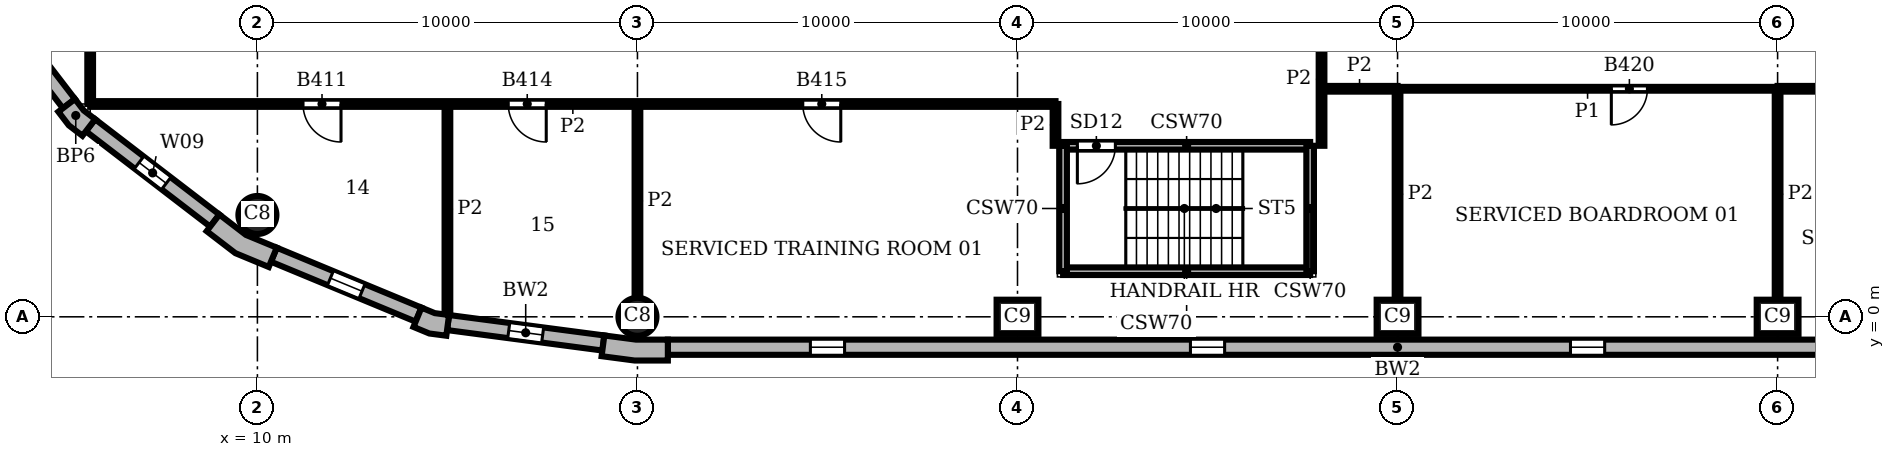
"""IFC4 building model, lengths in metres.
Left out: names, types, materials, properties, quantities, classifications, styles, units other than length and angle.
Written with IfcOpenShell. Run it as: python <this file> out.ifc"""

import sys

from ifc_helpers import new_model, si_unit, direction, frame, frame_2d, origin, origin_2d, place, context, subcontext, project, spatial, polyline, rectangle, circle, outline, extrude, element, fill, save


model = new_model("IFC4")
c1 = context("Model", 3, precision=1e-05, world=origin(), true_north=direction((0.0, 1.0)))
c2 = subcontext(c1, "Body", "Model", "MODEL_VIEW")
j1 = project(units=[si_unit("LENGTHUNIT", "METRE"), si_unit("PLANEANGLEUNIT", "RADIAN")], contexts=[c1])
p1 = place(None, origin())
s1 = spatial("IfcSite", under=j1, at=p1, CompositionType="ELEMENT")
p2 = place(p1, origin())
s2 = spatial("IfcBuilding", under=s1, at=p2, CompositionType="ELEMENT")
p3 = place(p2, frame((0.0, 0.0, 166.8)))
s3 = spatial("IfcBuildingStorey", under=s2, at=p3, CompositionType="ELEMENT", Elevation=166.8)
p4 = place(p3, frame((20.0, 0.0, 0.0), z_axis=(0.0, 0.0, 1.0), x_axis=(1.0, 0.0, 0.0)))
e1 = element("IfcColumn", 1, at=p4, inside=s3, PredefinedType="COLUMN", context=c2, shape_type="SweptSolid", body=[
    extrude(circle(Radius=0.5, at=origin_2d()), origin(), (0.0, 0.0, 1.0), 3.9),
])
for number, where, z_axis, x_axis in (
    (2, (30.0, 0.0, 0.0), (0.0, 0.0, 1.0), (1.0, 0.0, 0.0)),
    (3, (40.0, 0.0, 0.0), (0.0, 0.0, 1.0), (1.0, 0.0, 0.0)),
    (4, (50.0, 0.0, 0.0), (0.0, 0.0, 1.0), (1.0, 0.0, 0.0)),
):
    element("IfcColumn", number, at=place(p3, frame(where, z_axis=z_axis, x_axis=x_axis)), inside=s3, PredefinedType="COLUMN", context=c2, shape_type="SweptSolid", body=[
        extrude(rectangle(XDim=1.1, YDim=0.9, at=origin_2d()), origin(), (0.0, 0.0, 1.0), 3.9),
    ])
p5 = place(p3, frame((10.0, 2.679, 0.0), z_axis=(0.0, 0.0, 1.0), x_axis=(1.0, 0.0, 0.0)))
e5 = element("IfcColumn", 5, at=p5, inside=s3, PredefinedType="COLUMN", context=c2, shape_type="SweptSolid", body=[
    extrude(circle(Radius=0.5, at=origin_2d()), origin(), (0.0, 0.0, 1.0), 3.9),
])
p6 = place(p3, origin())
e6 = element("IfcWall", 6, at=p6, inside=s3, PredefinedType="SOLIDWALL", context=c2, shape_type="SweptSolid", body=[
    extrude(outline(polyline([(19.076, -0.887), (19.057, -1.036), (19.925, -1.15), (20.8, -1.15), (20.8, -1.0), (20.8, -0.6), (19.961, -0.6), (19.128, -0.49), (19.076, -0.887)])), origin(), (0.0, 0.0, 1.0), 3.9),
])
e7 = element("IfcWall", 7, at=p6, inside=s3, PredefinedType="SOLIDWALL", context=c2, shape_type="SweptSolid", body=[
    extrude(outline(polyline([(4.882, 5.487), (4.763, 5.396), (5.038, 5.038), (5.396, 4.763), (5.487, 4.882), (5.731, 5.199), (5.43, 5.43), (5.199, 5.731), (4.882, 5.487)])), origin(), (0.0, 0.0, 1.0), 3.9),
])
e8 = element("IfcWall", 8, at=p6, inside=s3, PredefinedType="SOLIDWALL", context=c2, shape_type="SweptSolid", body=[
    extrude(outline(polyline([(8.757, 2.373), (8.665, 2.254), (9.42, 1.675), (10.299, 1.311), (10.356, 1.449), (10.51, 1.819), (9.698, 2.155), (9.0, 2.69), (8.757, 2.373)])), origin(), (0.0, 0.0, 1.0), 3.9),
])
e9 = element("IfcWall", 9, at=p6, inside=s3, PredefinedType="SOLIDWALL", context=c2, shape_type="SweptSolid", body=[
    extrude(outline(polyline([(14.164, -0.128), (14.106, -0.266), (14.523, -0.439), (14.971, -0.498), (14.99, -0.349), (15.043, 0.047), (14.667, 0.097), (14.317, 0.242), (14.164, -0.128)])), origin(), (0.0, 0.0, 1.0), 3.9),
])
p7 = place(p3, frame((20.8, -0.8, 0.0), z_axis=(0.0, 0.0, 1.0), x_axis=(1.0, 0.0, 0.0)))
e10 = element("IfcWall", 10, at=p7, inside=s3, PredefinedType="SOLIDWALL", context=c2, shape_type="SweptSolid", body=[
    extrude(rectangle(XDim=38.4, YDim=0.4, at=frame_2d((19.2, 0.0))), origin(), (0.0, 0.0, 1.0), 3.9),
])
p8 = place(p7, frame((3.75, 0.0, 0.9)))
e11 = element("IfcOpeningElement", 11, at=p8, cuts=e10, PredefinedType="OPENING", context=c2, shape_type="SweptSolid", body=[
    extrude(rectangle(XDim=0.9, YDim=2.35, at=frame_2d((0.45, 1.175))), frame((0.0, 0.21, 0.0), z_axis=(0.0, -1.0, 0.0), x_axis=(1.0, 0.0, 0.0)), (0.0, 0.0, 1.0), 0.42),
])
p9 = place(p7, frame((13.75, 0.0, 0.9)))
e12 = element("IfcOpeningElement", 12, at=p9, cuts=e10, PredefinedType="OPENING", context=c2, shape_type="SweptSolid", body=[
    extrude(rectangle(XDim=0.9, YDim=2.35, at=frame_2d((0.45, 1.175))), frame((0.0, 0.21, 0.0), z_axis=(0.0, -1.0, 0.0), x_axis=(1.0, 0.0, 0.0)), (0.0, 0.0, 1.0), 0.42),
])
p10 = place(p7, frame((23.75, 0.0, 0.9)))
e13 = element("IfcOpeningElement", 13, at=p10, cuts=e10, PredefinedType="OPENING", context=c2, shape_type="SweptSolid", body=[
    extrude(rectangle(XDim=0.9, YDim=2.35, at=frame_2d((0.45, 1.175))), frame((0.0, 0.21, 0.0), z_axis=(0.0, -1.0, 0.0), x_axis=(1.0, 0.0, 0.0)), (0.0, 0.0, 1.0), 0.42),
])
p11 = place(p7, frame((33.75, 0.0, 0.9)))
e14 = element("IfcOpeningElement", 14, at=p11, cuts=e10, PredefinedType="OPENING", context=c2, shape_type="SweptSolid", body=[
    extrude(rectangle(XDim=0.9, YDim=2.35, at=frame_2d((0.45, 1.175))), frame((0.0, 0.21, 0.0), z_axis=(0.0, -1.0, 0.0), x_axis=(1.0, 0.0, 0.0)), (0.0, 0.0, 1.0), 0.42),
])
p12 = place(p3, frame((2.532, 8.878, 0.0), z_axis=(0.0, 0.0, 1.0), x_axis=(0.608759824817, -0.793354571229, 0.0)))
e15 = element("IfcWall", 15, at=p12, inside=s3, PredefinedType="SOLIDWALL", context=c2, shape_type="SweptSolid", body=[
    extrude(rectangle(XDim=4.121, YDim=0.4, at=frame_2d((2.061, 0.0))), origin(), (0.0, 0.0, 1.0), 3.9),
])
p13 = place(p12, frame((1.611, 0.0, 0.9)))
e16 = element("IfcOpeningElement", 16, at=p13, cuts=e15, PredefinedType="OPENING", context=c2, shape_type="SweptSolid", body=[
    extrude(rectangle(XDim=0.9, YDim=2.35, at=frame_2d((0.45, 1.175))), frame((0.0, 0.21, 0.0), z_axis=(0.0, -1.0, 0.0), x_axis=(1.0, 0.0, 0.0)), (0.0, 0.0, 1.0), 0.42),
])
p14 = place(p3, frame((5.609, 5.041, 0.0), z_axis=(0.0, 0.0, 1.0), x_axis=(0.793354571229, -0.608759824817, 0.0)))
e17 = element("IfcWall", 17, at=p14, inside=s3, PredefinedType="SOLIDWALL", context=c2, shape_type="SweptSolid", body=[
    extrude(rectangle(XDim=4.121, YDim=0.4, at=frame_2d((2.061, 0.0))), origin(), (0.0, 0.0, 1.0), 3.9),
])
p15 = place(p14, frame((1.611, 0.0, 0.9)))
e18 = element("IfcOpeningElement", 18, at=p15, cuts=e17, PredefinedType="OPENING", context=c2, shape_type="SweptSolid", body=[
    extrude(rectangle(XDim=0.9, YDim=2.35, at=frame_2d((0.45, 1.175))), frame((0.0, 0.21, 0.0), z_axis=(0.0, -1.0, 0.0), x_axis=(1.0, 0.0, 0.0)), (0.0, 0.0, 1.0), 0.42),
])
p16 = place(p3, frame((10.433, 1.634, 0.0), z_axis=(0.0, 0.0, 1.0), x_axis=(0.923863744394, -0.382721546029, 0.0)))
e19 = element("IfcWall", 19, at=p16, inside=s3, PredefinedType="SOLIDWALL", context=c2, shape_type="SweptSolid", body=[
    extrude(rectangle(XDim=4.121, YDim=0.4, at=frame_2d((2.061, 0.0))), origin(), (0.0, 0.0, 1.0), 3.9),
])
p17 = place(p16, frame((1.611, 0.0, 0.9)))
e20 = element("IfcOpeningElement", 20, at=p17, cuts=e19, PredefinedType="OPENING", context=c2, shape_type="SweptSolid", body=[
    extrude(rectangle(XDim=0.9, YDim=2.35, at=frame_2d((0.45, 1.175))), frame((0.0, 0.21, 0.0), z_axis=(0.0, -1.0, 0.0), x_axis=(1.0, 0.0, 0.0)), (0.0, 0.0, 1.0), 0.42),
])
p18 = place(p3, frame((15.017, -0.151, 0.0), z_axis=(0.0, 0.0, 1.0), x_axis=(0.991446429508, -0.130514280502, 0.0)))
e21 = element("IfcWall", 21, at=p18, inside=s3, PredefinedType="SOLIDWALL", context=c2, shape_type="SweptSolid", body=[
    extrude(rectangle(XDim=4.121, YDim=0.4, at=frame_2d((2.061, 0.0))), origin(), (0.0, 0.0, 1.0), 3.9),
])
p19 = place(p18, frame((1.611, 0.0, 0.9)))
e22 = element("IfcOpeningElement", 22, at=p19, cuts=e21, PredefinedType="OPENING", context=c2, shape_type="SweptSolid", body=[
    extrude(rectangle(XDim=0.9, YDim=2.35, at=frame_2d((0.45, 1.175))), frame((0.0, 0.21, 0.0), z_axis=(0.0, -1.0, 0.0), x_axis=(1.0, 0.0, 0.0)), (0.0, 0.0, 1.0), 0.42),
])
p20 = place(p3, frame((31.2, 1.2, 0.0), z_axis=(0.0, 0.0, 1.0), x_axis=(1.0, 0.0, 0.0)))
e23 = element("IfcWall", 23, at=p20, inside=s3, PredefinedType="SHEAR", context=c2, shape_type="SweptSolid", body=[
    extrude(rectangle(XDim=6.5, YDim=0.2, at=frame_2d((3.25, 0.0))), origin(), (0.0, 0.0, 1.0), 3.58),
])
p21 = place(p3, frame((31.2, 4.5, 0.0), z_axis=(0.0, 0.0, 1.0), x_axis=(1.0, 0.0, 0.0)))
e24 = element("IfcWall", 24, at=p21, inside=s3, PredefinedType="SHEAR", context=c2, shape_type="SweptSolid", body=[
    extrude(rectangle(XDim=6.5, YDim=0.2, at=frame_2d((3.25, 0.0))), origin(), (0.0, 0.0, 1.0), 3.58),
])
p22 = place(p21, frame((0.375, 0.0, 0.0)))
e25 = element("IfcOpeningElement", 25, at=p22, cuts=e24, PredefinedType="OPENING", context=c2, shape_type="SweptSolid", body=[
    extrude(rectangle(XDim=1.0, YDim=2.1, at=frame_2d((0.5, 1.05))), frame((0.0, 0.11, 0.0), z_axis=(0.0, -1.0, 0.0), x_axis=(1.0, 0.0, 0.0)), (0.0, 0.0, 1.0), 0.22),
])
for number, where, z_axis, x_axis in (
    (26, (31.2, 1.2, 0.0), (0.0, 0.0, 1.0), (0.0, 1.0, 0.0)),
    (27, (37.7, 1.2, 0.0), (0.0, 0.0, 1.0), (0.0, 1.0, 0.0)),
):
    element("IfcWall", number, at=place(p3, frame(where, z_axis=z_axis, x_axis=x_axis)), inside=s3, PredefinedType="SHEAR", context=c2, shape_type="SweptSolid", body=[
        extrude(rectangle(XDim=3.3, YDim=0.2, at=frame_2d((1.65, 0.0))), origin(), (0.0, 0.0, 1.0), 3.58),
    ])
p23 = place(p3, frame((40.0, 6.0, 0.0), z_axis=(0.0, 0.0, 1.0), x_axis=(1.0, 0.0, 0.0)))
e28 = element("IfcWall", 28, at=p23, inside=s3, PredefinedType="PARTITIONING", context=c2, shape_type="SweptSolid", body=[
    extrude(rectangle(XDim=10.0, YDim=0.1, at=frame_2d((5.0, 0.0))), origin(), (0.0, 0.0, 1.0), 3.58),
])
p24 = place(p23, frame((5.625, 0.0, 0.0)))
e29 = element("IfcOpeningElement", 29, at=p24, cuts=e28, PredefinedType="OPENING", context=c2, shape_type="SweptSolid", body=[
    extrude(rectangle(XDim=0.95, YDim=2.1, at=frame_2d((0.475, 1.05))), frame((0.0, 0.06, 0.0), z_axis=(0.0, -1.0, 0.0), x_axis=(1.0, 0.0, 0.0)), (0.0, 0.0, 1.0), 0.12),
])
p25 = place(p3, frame((5.6, 5.6, 0.0), z_axis=(0.0, 0.0, 1.0), x_axis=(0.0, 1.0, 0.0)))
e30 = element("IfcWall", 30, at=p25, inside=s3, PredefinedType="PARTITIONING", context=c2, shape_type="SweptSolid", body=[
    extrude(rectangle(XDim=22.4, YDim=0.15, at=frame_2d((11.2, 0.0))), origin(), (0.0, 0.0, 1.0), 3.58),
])
p26 = place(p25, frame((5.35, 0.0, 0.0)))
e31 = element("IfcOpeningElement", 31, at=p26, cuts=e30, PredefinedType="OPENING", context=c2, shape_type="SweptSolid", body=[
    extrude(rectangle(XDim=1.0, YDim=2.1, at=frame_2d((0.5, 1.05))), frame((0.0, 0.085, 0.0), z_axis=(0.0, -1.0, 0.0), x_axis=(1.0, 0.0, 0.0)), (0.0, 0.0, 1.0), 0.17),
])
p27 = place(p25, frame((11.25, 0.0, 0.0)))
e32 = element("IfcOpeningElement", 32, at=p27, cuts=e30, PredefinedType="OPENING", context=c2, shape_type="SweptSolid", body=[
    extrude(rectangle(XDim=1.0, YDim=2.1, at=frame_2d((0.5, 1.05))), frame((0.0, 0.085, 0.0), z_axis=(0.0, -1.0, 0.0), x_axis=(1.0, 0.0, 0.0)), (0.0, 0.0, 1.0), 0.17),
])
p28 = place(p25, frame((18.25, 0.0, 0.0)))
e33 = element("IfcOpeningElement", 33, at=p28, cuts=e30, PredefinedType="OPENING", context=c2, shape_type="SweptSolid", body=[
    extrude(rectangle(XDim=1.8, YDim=2.1, at=frame_2d((0.9, 1.05))), frame((0.0, 0.085, 0.0), z_axis=(0.0, -1.0, 0.0), x_axis=(1.0, 0.0, 0.0)), (0.0, 0.0, 1.0), 0.17),
])
p29 = place(p3, frame((15.0, 0.063, 0.0), z_axis=(0.0, 0.0, 1.0), x_axis=(0.0, 1.0, 0.0)))
e34 = element("IfcWall", 34, at=p29, inside=s3, PredefinedType="PARTITIONING", context=c2, shape_type="SweptSolid", body=[
    extrude(rectangle(XDim=5.537, YDim=0.15, at=frame_2d((2.769, 0.0))), origin(), (0.0, 0.0, 1.0), 3.58),
])
p30 = place(p3, frame((20.0, 0.5, 0.0), z_axis=(0.0, 0.0, 1.0), x_axis=(0.0, 1.0, 0.0)))
e35 = element("IfcWall", 35, at=p30, inside=s3, PredefinedType="PARTITIONING", context=c2, shape_type="SweptSolid", body=[
    extrude(rectangle(XDim=5.1, YDim=0.15, at=frame_2d((2.55, 0.0))), origin(), (0.0, 0.0, 1.0), 3.58),
])
p31 = place(p3, frame((31.0, 4.5, 0.0), z_axis=(0.0, 0.0, 1.0), x_axis=(0.0, 1.0, 0.0)))
e36 = element("IfcWall", 36, at=p31, inside=s3, PredefinedType="PARTITIONING", context=c2, shape_type="SweptSolid", body=[
    extrude(rectangle(XDim=1.1, YDim=0.15, at=frame_2d((0.55, 0.0))), origin(), (0.0, 0.0, 1.0), 3.58),
])
p32 = place(p3, frame((38.0, 4.5, 0.0), z_axis=(0.0, 0.0, 1.0), x_axis=(0.0, 1.0, 0.0)))
e37 = element("IfcWall", 37, at=p32, inside=s3, PredefinedType="PARTITIONING", context=c2, shape_type="SweptSolid", body=[
    extrude(rectangle(XDim=3.5, YDim=0.15, at=frame_2d((1.75, 0.0))), origin(), (0.0, 0.0, 1.0), 3.58),
])
for number, where, z_axis, x_axis in (
    (38, (40.0, 0.45, 0.0), (0.0, 0.0, 1.0), (0.0, 1.0, 0.0)),
    (39, (50.0, 0.45, 0.0), (0.0, 0.0, 1.0), (0.0, 1.0, 0.0)),
):
    element("IfcWall", number, at=place(p3, frame(where, z_axis=z_axis, x_axis=x_axis)), inside=s3, PredefinedType="PARTITIONING", context=c2, shape_type="SweptSolid", body=[
        extrude(rectangle(XDim=5.55, YDim=0.15, at=frame_2d((2.775, 0.0))), origin(), (0.0, 0.0, 1.0), 3.58),
    ])
p33 = place(p3, frame((5.6, 5.6, 0.0), z_axis=(0.0, 0.0, 1.0), x_axis=(1.0, 0.0, 0.0)))
e40 = element("IfcWall", 40, at=p33, inside=s3, PredefinedType="PARTITIONING", context=c2, shape_type="SweptSolid", body=[
    extrude(rectangle(XDim=25.4, YDim=0.15, at=frame_2d((12.7, 0.0))), origin(), (0.0, 0.0, 1.0), 3.58),
])
p34 = place(p33, frame((5.6, 0.0, 0.0)))
e41 = element("IfcOpeningElement", 41, at=p34, cuts=e40, PredefinedType="OPENING", context=c2, shape_type="SweptSolid", body=[
    extrude(rectangle(XDim=1.0, YDim=2.1, at=frame_2d((0.5, 1.05))), frame((0.0, 0.085, 0.0), z_axis=(0.0, -1.0, 0.0), x_axis=(1.0, 0.0, 0.0)), (0.0, 0.0, 1.0), 0.17),
])
p35 = place(p33, frame((11.0, 0.0, 0.0)))
e42 = element("IfcOpeningElement", 42, at=p35, cuts=e40, PredefinedType="OPENING", context=c2, shape_type="SweptSolid", body=[
    extrude(rectangle(XDim=1.0, YDim=2.1, at=frame_2d((0.5, 1.05))), frame((0.0, 0.085, 0.0), z_axis=(0.0, -1.0, 0.0), x_axis=(1.0, 0.0, 0.0)), (0.0, 0.0, 1.0), 0.17),
])
p36 = place(p33, frame((18.75, 0.0, 0.0)))
e43 = element("IfcOpeningElement", 43, at=p36, cuts=e40, PredefinedType="OPENING", context=c2, shape_type="SweptSolid", body=[
    extrude(rectangle(XDim=1.0, YDim=2.1, at=frame_2d((0.5, 1.05))), frame((0.0, 0.085, 0.0), z_axis=(0.0, -1.0, 0.0), x_axis=(1.0, 0.0, 0.0)), (0.0, 0.0, 1.0), 0.17),
])
p37 = place(p3, frame((38.0, 6.0, 0.0), z_axis=(0.0, 0.0, 1.0), x_axis=(1.0, 0.0, 0.0)))
e44 = element("IfcWall", 44, at=p37, inside=s3, PredefinedType="PARTITIONING", context=c2, shape_type="SweptSolid", body=[
    extrude(rectangle(XDim=2.0, YDim=0.15, at=frame_2d((1.0, 0.0))), origin(), (0.0, 0.0, 1.0), 3.58),
])
p38 = place(p3, frame((50.0, 6.0, 0.0), z_axis=(0.0, 0.0, 1.0), x_axis=(1.0, 0.0, 0.0)))
e45 = element("IfcWall", 45, at=p38, inside=s3, PredefinedType="PARTITIONING", context=c2, shape_type="SweptSolid", body=[
    extrude(rectangle(XDim=5.0, YDim=0.15, at=frame_2d((2.5, 0.0))), origin(), (0.0, 0.0, 1.0), 3.58),
])
p39 = place(p8, origin())
e46 = element("IfcWindow", 46, at=p39, inside=s3, PartitioningType="SINGLE_PANEL", PredefinedType="WINDOW", context=c2, shape_type="SweptSolid", body=[
    extrude(rectangle(XDim=0.9, YDim=2.35, at=frame_2d((0.45, 1.175))), frame((0.0, 0.16, 0.0), z_axis=(0.0, -1.0, 0.0), x_axis=(1.0, 0.0, 0.0)), (0.0, 0.0, 1.0), 0.06),
])
fill(e11, e46)
p40 = place(p9, origin())
e47 = element("IfcWindow", 47, at=p40, inside=s3, PartitioningType="SINGLE_PANEL", PredefinedType="WINDOW", context=c2, shape_type="SweptSolid", body=[
    extrude(rectangle(XDim=0.9, YDim=2.35, at=frame_2d((0.45, 1.175))), frame((0.0, 0.16, 0.0), z_axis=(0.0, -1.0, 0.0), x_axis=(1.0, 0.0, 0.0)), (0.0, 0.0, 1.0), 0.06),
])
fill(e12, e47)
p41 = place(p10, origin())
e48 = element("IfcWindow", 48, at=p41, inside=s3, PartitioningType="SINGLE_PANEL", PredefinedType="WINDOW", context=c2, shape_type="SweptSolid", body=[
    extrude(rectangle(XDim=0.9, YDim=2.35, at=frame_2d((0.45, 1.175))), frame((0.0, 0.16, 0.0), z_axis=(0.0, -1.0, 0.0), x_axis=(1.0, 0.0, 0.0)), (0.0, 0.0, 1.0), 0.06),
])
fill(e13, e48)
p42 = place(p15, origin())
e49 = element("IfcWindow", 49, at=p42, inside=s3, PartitioningType="SINGLE_PANEL", PredefinedType="WINDOW", context=c2, shape_type="SweptSolid", body=[
    extrude(rectangle(XDim=0.9, YDim=2.35, at=frame_2d((0.45, 1.175))), frame((0.0, 0.16, 0.0), z_axis=(0.0, -1.0, 0.0), x_axis=(1.0, 0.0, 0.0)), (0.0, 0.0, 1.0), 0.06),
])
fill(e18, e49)
p43 = place(p17, origin())
e50 = element("IfcWindow", 50, at=p43, inside=s3, PartitioningType="SINGLE_PANEL", PredefinedType="WINDOW", context=c2, shape_type="SweptSolid", body=[
    extrude(rectangle(XDim=0.9, YDim=2.35, at=frame_2d((0.45, 1.175))), frame((0.0, 0.16, 0.0), z_axis=(0.0, -1.0, 0.0), x_axis=(1.0, 0.0, 0.0)), (0.0, 0.0, 1.0), 0.06),
])
fill(e20, e50)
p44 = place(p19, origin())
e51 = element("IfcWindow", 51, at=p44, inside=s3, PartitioningType="SINGLE_PANEL", PredefinedType="WINDOW", context=c2, shape_type="SweptSolid", body=[
    extrude(rectangle(XDim=0.9, YDim=2.35, at=frame_2d((0.45, 1.175))), frame((0.0, 0.16, 0.0), z_axis=(0.0, -1.0, 0.0), x_axis=(1.0, 0.0, 0.0)), (0.0, 0.0, 1.0), 0.06),
])
fill(e22, e51)
p45 = place(p22, frame((1.0, 0.0, 0.0), z_axis=(0.0, 0.0, 1.0), x_axis=(-1.0, 0.0, 0.0)))
e52 = element("IfcDoor", 52, at=p45, inside=s3, OperationType="SINGLE_SWING_RIGHT", PredefinedType="DOOR", context=c2, shape_type="SweptSolid", body=[
    extrude(rectangle(XDim=1.0, YDim=2.1, at=frame_2d((0.5, 1.05))), frame((0.0, 0.025, 0.0), z_axis=(0.0, -1.0, 0.0), x_axis=(1.0, 0.0, 0.0)), (0.0, 0.0, 1.0), 0.05),
])
fill(e25, e52)
p46 = place(p34, frame((1.0, 0.0, 0.0), z_axis=(0.0, 0.0, 1.0), x_axis=(-1.0, 0.0, 0.0)))
e53 = element("IfcDoor", 53, at=p46, inside=s3, OperationType="SINGLE_SWING_LEFT", PredefinedType="DOOR", context=c2, shape_type="SweptSolid", body=[
    extrude(rectangle(XDim=1.0, YDim=2.1, at=frame_2d((0.5, 1.05))), frame((0.0, 0.025, 0.0), z_axis=(0.0, -1.0, 0.0), x_axis=(1.0, 0.0, 0.0)), (0.0, 0.0, 1.0), 0.05),
])
fill(e41, e53)
p47 = place(p35, frame((1.0, 0.0, 0.0), z_axis=(0.0, 0.0, 1.0), x_axis=(-1.0, 0.0, 0.0)))
e54 = element("IfcDoor", 54, at=p47, inside=s3, OperationType="SINGLE_SWING_LEFT", PredefinedType="DOOR", context=c2, shape_type="SweptSolid", body=[
    extrude(rectangle(XDim=1.0, YDim=2.1, at=frame_2d((0.5, 1.05))), frame((0.0, 0.025, 0.0), z_axis=(0.0, -1.0, 0.0), x_axis=(1.0, 0.0, 0.0)), (0.0, 0.0, 1.0), 0.05),
])
fill(e42, e54)
p48 = place(p36, frame((1.0, 0.0, 0.0), z_axis=(0.0, 0.0, 1.0), x_axis=(-1.0, 0.0, 0.0)))
e55 = element("IfcDoor", 55, at=p48, inside=s3, OperationType="SINGLE_SWING_LEFT", PredefinedType="DOOR", context=c2, shape_type="SweptSolid", body=[
    extrude(rectangle(XDim=1.0, YDim=2.1, at=frame_2d((0.5, 1.05))), frame((0.0, 0.025, 0.0), z_axis=(0.0, -1.0, 0.0), x_axis=(1.0, 0.0, 0.0)), (0.0, 0.0, 1.0), 0.05),
])
fill(e43, e55)
p49 = place(p24, frame((0.95, 0.0, 0.0), z_axis=(0.0, 0.0, 1.0), x_axis=(-1.0, 0.0, 0.0)))
e56 = element("IfcDoor", 56, at=p49, inside=s3, OperationType="SINGLE_SWING_RIGHT", PredefinedType="DOOR", context=c2, shape_type="SweptSolid", body=[
    extrude(rectangle(XDim=0.95, YDim=2.1, at=frame_2d((0.475, 1.05))), frame((0.0, 0.025, 0.0), z_axis=(0.0, -1.0, 0.0), x_axis=(1.0, 0.0, 0.0)), (0.0, 0.0, 1.0), 0.05),
])
fill(e29, e56)
save(model, sys.argv[1])
